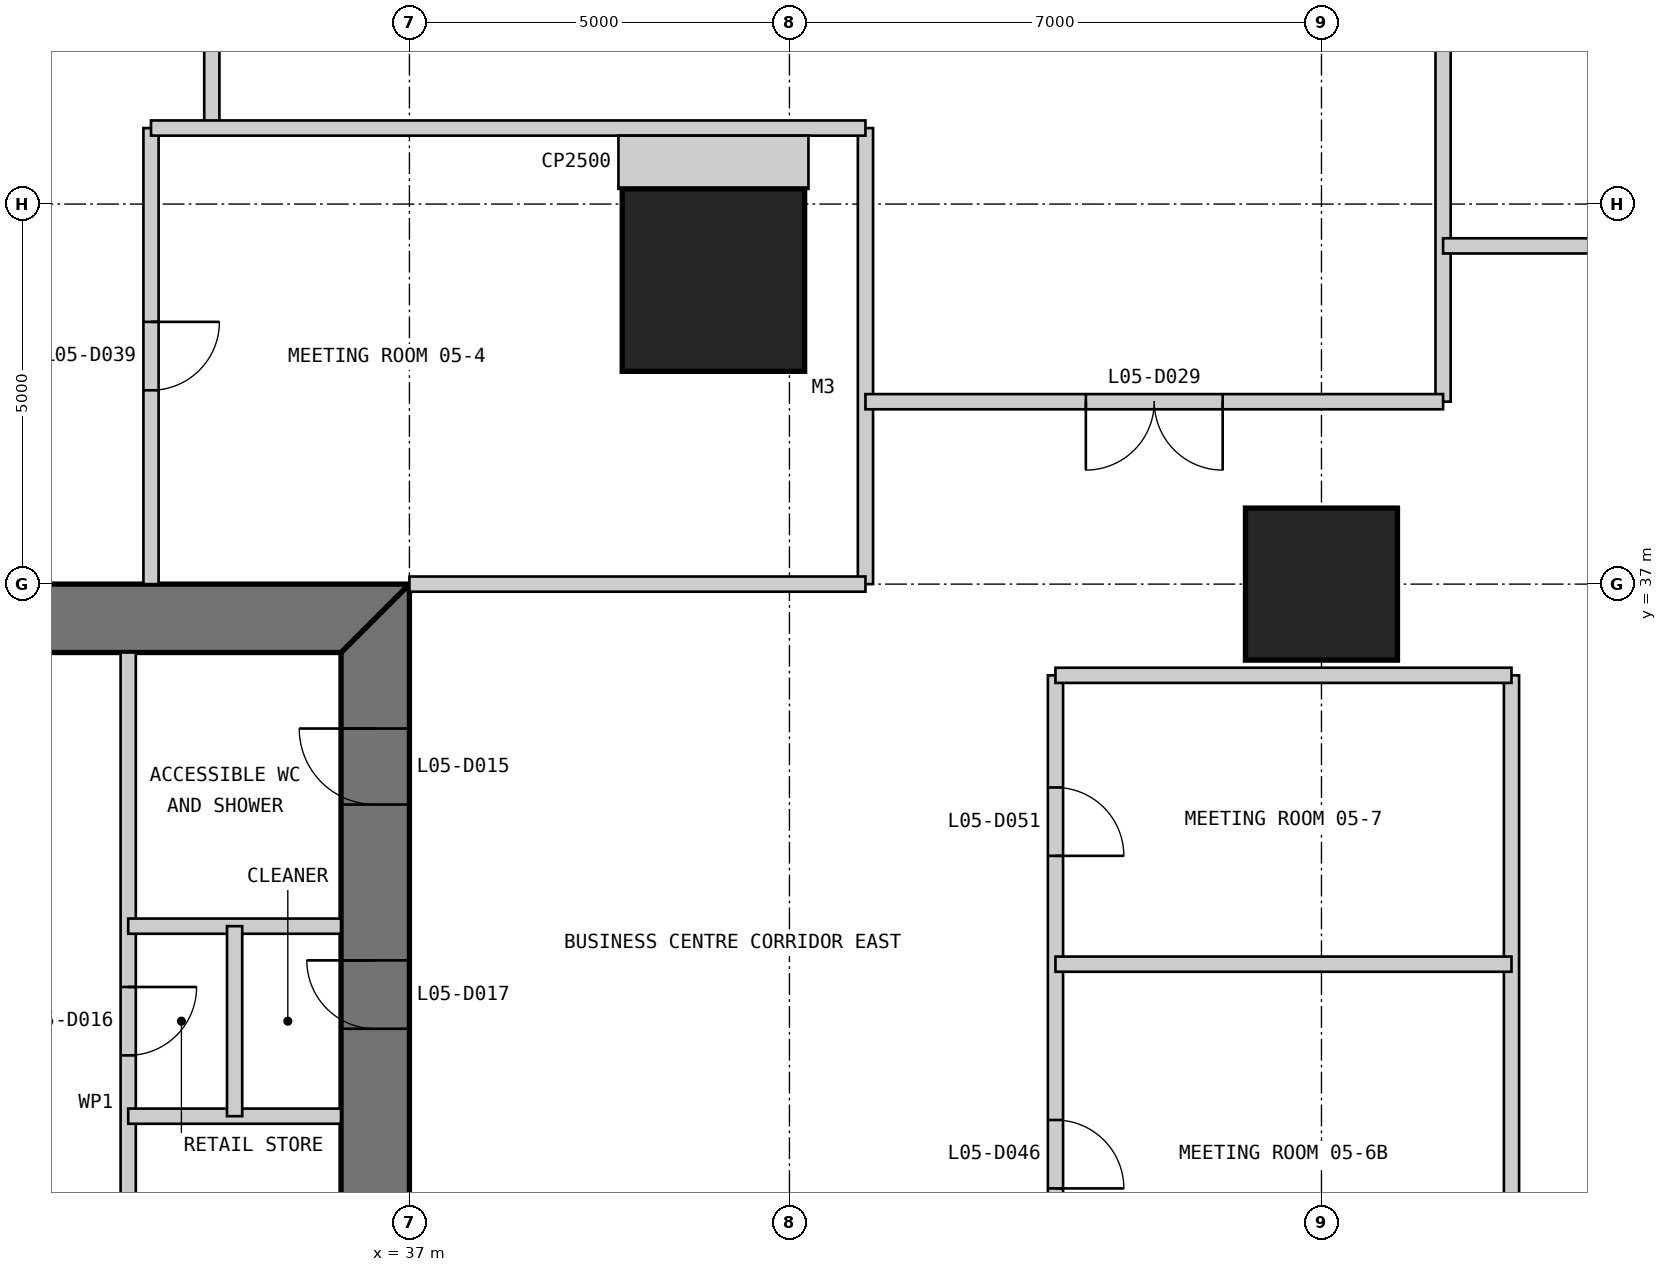
"""IFC4 building model, lengths in metres.
Left out: names, types, materials, properties, quantities, classifications, styles, units other than length and angle.
Written with IfcOpenShell. Run it as: python <this file> out.ifc"""

import sys

from ifc_helpers import new_model, si_unit, direction, frame, frame_2d, origin, origin_2d, place, context, subcontext, project, spatial, polyline, rectangle, outline, extrude, element, fill, save


model = new_model("IFC4")
c1 = context("Model", 3, precision=1e-05, world=origin(), true_north=direction((0.0, 1.0)))
c2 = subcontext(c1, "Body", "Model", "MODEL_VIEW")
j1 = project(units=[si_unit("LENGTHUNIT", "METRE"), si_unit("PLANEANGLEUNIT", "RADIAN")], contexts=[c1])
p1 = place(None, origin())
s1 = spatial("IfcSite", under=j1, at=p1, CompositionType="ELEMENT")
p2 = place(p1, origin())
s2 = spatial("IfcBuilding", under=s1, at=p2, CompositionType="ELEMENT")
p3 = place(p2, frame((0.0, 0.0, 26.2)))
s3 = spatial("IfcBuildingStorey", under=s2, at=p3, CompositionType="ELEMENT", Elevation=26.2)
p4 = place(p3, frame((41.0, 41.0, 0.0), z_axis=(0.0, 0.0, 1.0), x_axis=(1.0, 0.0, 0.0)))
e1 = element("IfcColumn", 1, at=p4, inside=s3, PredefinedType="COLUMN", context=c2, shape_type="SweptSolid", body=[
    extrude(rectangle(XDim=2.4, YDim=2.4, at=origin_2d()), origin(), (0.0, 0.0, 1.0), 4.8),
])
p5 = place(p3, frame((49.0, 37.0, 0.0), z_axis=(0.0, 0.0, 1.0), x_axis=(1.0, 0.0, 0.0)))
e2 = element("IfcColumn", 2, at=p5, inside=s3, PredefinedType="COLUMN", context=c2, shape_type="SweptSolid", body=[
    extrude(rectangle(XDim=2.0, YDim=2.0, at=origin_2d()), origin(), (0.0, 0.0, 1.0), 4.8),
])
p6 = place(p3, frame((36.55, 13.9, 0.0), z_axis=(0.0, 0.0, 1.0), x_axis=(0.0, 1.0, 0.0)))
e3 = element("IfcWall", 3, at=p6, inside=s3, PredefinedType="SHEAR", context=c2, shape_type="SweptSolid", body=[
    extrude(outline(polyline([(-0.9, -0.45), (23.1, -0.45), (22.2, 0.45), (0.0, 0.45), (-0.9, -0.45)])), origin(), (0.0, 0.0, 1.0), 4.8),
])
p7 = place(p6, frame((20.2, 0.0, 0.0)))
e4 = element("IfcOpeningElement", 4, at=p7, cuts=e3, PredefinedType="OPENING", context=c2, shape_type="SweptSolid", body=[
    extrude(rectangle(XDim=1.0, YDim=2.2, at=frame_2d((0.5, 1.1))), frame((0.0, 0.46, 0.0), z_axis=(0.0, -1.0, 0.0), x_axis=(1.0, 0.0, 0.0)), (0.0, 0.0, 1.0), 0.92),
])
p8 = place(p6, frame((17.25, 0.0, 0.0)))
e5 = element("IfcOpeningElement", 5, at=p8, cuts=e3, PredefinedType="OPENING", context=c2, shape_type="SweptSolid", body=[
    extrude(rectangle(XDim=0.9, YDim=2.2, at=frame_2d((0.45, 1.1))), frame((0.0, 0.46, 0.0), z_axis=(0.0, -1.0, 0.0), x_axis=(1.0, 0.0, 0.0)), (0.0, 0.0, 1.0), 0.92),
])
p9 = place(p3, frame((37.0, 36.55, 0.0), z_axis=(0.0, 0.0, 1.0), x_axis=(-1.0, 0.0, 0.0)))
e6 = element("IfcWall", 6, at=p9, inside=s3, PredefinedType="SHEAR", context=c2, shape_type="SweptSolid", body=[
    extrude(outline(polyline([(0.0, -0.45), (24.0, -0.45), (23.1, 0.45), (0.9, 0.45), (0.0, -0.45)])), origin(), (0.0, 0.0, 1.0), 4.8),
])
p10 = place(p9, frame((4.9, 0.0, 0.0)))
e7 = element("IfcOpeningElement", 7, at=p10, cuts=e6, PredefinedType="OPENING", context=c2, shape_type="SweptSolid", body=[
    extrude(rectangle(XDim=1.0, YDim=2.2, at=frame_2d((0.5, 1.1))), frame((0.0, 0.46, 0.0), z_axis=(0.0, -1.0, 0.0), x_axis=(1.0, 0.0, 0.0)), (0.0, 0.0, 1.0), 0.92),
])
p11 = place(p9, frame((8.9, 0.0, 0.0)))
e8 = element("IfcOpeningElement", 8, at=p11, cuts=e6, PredefinedType="OPENING", context=c2, shape_type="SweptSolid", body=[
    extrude(rectangle(XDim=1.1, YDim=2.2, at=frame_2d((0.55, 1.1))), frame((0.0, 0.46, 0.0), z_axis=(0.0, -1.0, 0.0), x_axis=(1.0, 0.0, 0.0)), (0.0, 0.0, 1.0), 0.92),
])
p12 = place(p9, frame((15.05, 0.0, 0.0)))
e9 = element("IfcOpeningElement", 9, at=p12, cuts=e6, PredefinedType="OPENING", context=c2, shape_type="SweptSolid", body=[
    extrude(rectangle(XDim=0.9, YDim=2.2, at=frame_2d((0.45, 1.1))), frame((0.0, 0.46, 0.0), z_axis=(0.0, -1.0, 0.0), x_axis=(1.0, 0.0, 0.0)), (0.0, 0.0, 1.0), 0.92),
])
p13 = place(p9, frame((17.9, 0.0, 0.0)))
e10 = element("IfcOpeningElement", 10, at=p13, cuts=e6, PredefinedType="OPENING", context=c2, shape_type="SweptSolid", body=[
    extrude(rectangle(XDim=1.0, YDim=2.2, at=frame_2d((0.5, 1.1))), frame((0.0, 0.46, 0.0), z_axis=(0.0, -1.0, 0.0), x_axis=(1.0, 0.0, 0.0)), (0.0, 0.0, 1.0), 0.92),
])
p14 = place(p9, frame((21.4, 0.0, 0.0)))
e11 = element("IfcOpeningElement", 11, at=p14, cuts=e6, PredefinedType="OPENING", context=c2, shape_type="SweptSolid", body=[
    extrude(rectangle(XDim=1.0, YDim=2.2, at=frame_2d((0.5, 1.1))), frame((0.0, 0.46, 0.0), z_axis=(0.0, -1.0, 0.0), x_axis=(1.0, 0.0, 0.0)), (0.0, 0.0, 1.0), 0.92),
])
p15 = place(p3, frame((33.3, 36.1, 0.0), z_axis=(0.0, 0.0, 1.0), x_axis=(0.0, -1.0, 0.0)))
e12 = element("IfcWall", 12, at=p15, inside=s3, PredefinedType="PARTITIONING", context=c2, shape_type="SweptSolid", body=[
    extrude(rectangle(XDim=16.1, YDim=0.2, at=frame_2d((8.05, 0.0))), origin(), (0.0, 0.0, 1.0), 4.6),
])
p16 = place(p15, frame((4.4, 0.0, 0.0)))
e13 = element("IfcOpeningElement", 13, at=p16, cuts=e12, PredefinedType="OPENING", context=c2, shape_type="SweptSolid", body=[
    extrude(rectangle(XDim=0.9, YDim=2.2, at=frame_2d((0.45, 1.1))), frame((0.0, 0.11, 0.0), z_axis=(0.0, -1.0, 0.0), x_axis=(1.0, 0.0, 0.0)), (0.0, 0.0, 1.0), 0.22),
])
for number, where, z_axis, x_axis in (
    (14, (36.1, 30.0, 0.0), (0.0, 0.0, 1.0), (-1.0, 0.0, 0.0)),
    (15, (36.1, 32.5, 0.0), (0.0, 0.0, 1.0), (-1.0, 0.0, 0.0)),
):
    element("IfcWall", number, at=place(p3, frame(where, z_axis=z_axis, x_axis=x_axis)), inside=s3, PredefinedType="PARTITIONING", context=c2, shape_type="SweptSolid", body=[
        extrude(rectangle(XDim=2.8, YDim=0.2, at=frame_2d((1.4, 0.0))), origin(), (0.0, 0.0, 1.0), 4.6),
    ])
p17 = place(p3, frame((34.7, 32.5, 0.0), z_axis=(0.0, 0.0, 1.0), x_axis=(0.0, -1.0, 0.0)))
e16 = element("IfcWall", 16, at=p17, inside=s3, PredefinedType="PARTITIONING", context=c2, shape_type="SweptSolid", body=[
    extrude(rectangle(XDim=2.5, YDim=0.2, at=frame_2d((1.25, 0.0))), origin(), (0.0, 0.0, 1.0), 4.6),
])
p18 = place(p3, frame((33.6, 37.0, 0.0), z_axis=(0.0, 0.0, 1.0), x_axis=(0.0, 1.0, 0.0)))
e17 = element("IfcWall", 17, at=p18, inside=s3, PredefinedType="PARTITIONING", context=c2, shape_type="SweptSolid", body=[
    extrude(rectangle(XDim=6.0, YDim=0.2, at=frame_2d((3.0, 0.0))), origin(), (0.0, 0.0, 1.0), 4.5),
])
p19 = place(p18, frame((2.55, 0.0, 0.0)))
e18 = element("IfcOpeningElement", 18, at=p19, cuts=e17, PredefinedType="OPENING", context=c2, shape_type="SweptSolid", body=[
    extrude(rectangle(XDim=0.9, YDim=2.2, at=frame_2d((0.45, 1.1))), frame((0.0, 0.11, 0.0), z_axis=(0.0, -1.0, 0.0), x_axis=(1.0, 0.0, 0.0)), (0.0, 0.0, 1.0), 0.22),
])
p20 = place(p3, frame((34.4, 43.0, 0.0), z_axis=(0.0, 0.0, 1.0), x_axis=(0.0, 1.0, 0.0)))
e19 = element("IfcWall", 19, at=p20, inside=s3, PredefinedType="PARTITIONING", context=c2, shape_type="SweptSolid", body=[
    extrude(rectangle(XDim=22.25, YDim=0.2, at=frame_2d((11.125, 0.0))), origin(), (0.0, 0.0, 1.0), 4.5),
])
p21 = place(p20, frame((17.5, 0.0, 0.0)))
e20 = element("IfcOpeningElement", 20, at=p21, cuts=e19, PredefinedType="OPENING", context=c2, shape_type="SweptSolid", body=[
    extrude(rectangle(XDim=1.8, YDim=2.4, at=frame_2d((0.9, 1.2))), frame((0.0, 0.11, 0.0), z_axis=(0.0, -1.0, 0.0), x_axis=(1.0, 0.0, 0.0)), (0.0, 0.0, 1.0), 0.22),
])
p22 = place(p3, frame((43.0, 37.0, 0.0), z_axis=(0.0, 0.0, 1.0), x_axis=(0.0, 1.0, 0.0)))
e21 = element("IfcWall", 21, at=p22, inside=s3, PredefinedType="PARTITIONING", context=c2, shape_type="SweptSolid", body=[
    extrude(rectangle(XDim=6.0, YDim=0.2, at=frame_2d((3.0, 0.0))), origin(), (0.0, 0.0, 1.0), 4.5),
])
p23 = place(p3, frame((45.5, 22.0, 0.0), z_axis=(0.0, 0.0, 1.0), x_axis=(0.0, 1.0, 0.0)))
e22 = element("IfcWall", 22, at=p23, inside=s3, PredefinedType="PARTITIONING", context=c2, shape_type="SweptSolid", body=[
    extrude(rectangle(XDim=13.8, YDim=0.2, at=frame_2d((6.9, 0.0))), origin(), (0.0, 0.0, 1.0), 4.5),
])
p24 = place(p23, frame((2.075, 0.0, 0.0)))
e23 = element("IfcOpeningElement", 23, at=p24, cuts=e22, PredefinedType="OPENING", context=c2, shape_type="SweptSolid", body=[
    extrude(rectangle(XDim=0.9, YDim=2.2, at=frame_2d((0.45, 1.1))), frame((0.0, 0.11, 0.0), z_axis=(0.0, -1.0, 0.0), x_axis=(1.0, 0.0, 0.0)), (0.0, 0.0, 1.0), 0.22),
])
p25 = place(p23, frame((7.05, 0.0, 0.0)))
e24 = element("IfcOpeningElement", 24, at=p25, cuts=e22, PredefinedType="OPENING", context=c2, shape_type="SweptSolid", body=[
    extrude(rectangle(XDim=0.9, YDim=2.2, at=frame_2d((0.45, 1.1))), frame((0.0, 0.11, 0.0), z_axis=(0.0, -1.0, 0.0), x_axis=(1.0, 0.0, 0.0)), (0.0, 0.0, 1.0), 0.22),
])
p26 = place(p23, frame((11.425, 0.0, 0.0)))
e25 = element("IfcOpeningElement", 25, at=p26, cuts=e22, PredefinedType="OPENING", context=c2, shape_type="SweptSolid", body=[
    extrude(rectangle(XDim=0.9, YDim=2.2, at=frame_2d((0.45, 1.1))), frame((0.0, 0.11, 0.0), z_axis=(0.0, -1.0, 0.0), x_axis=(1.0, 0.0, 0.0)), (0.0, 0.0, 1.0), 0.22),
])
p27 = place(p3, frame((50.6, 39.4, 0.0), z_axis=(0.0, 0.0, 1.0), x_axis=(0.0, 1.0, 0.0)))
e26 = element("IfcWall", 26, at=p27, inside=s3, PredefinedType="PARTITIONING", context=c2, shape_type="SweptSolid", body=[
    extrude(rectangle(XDim=25.85, YDim=0.2, at=frame_2d((12.925, 0.0))), origin(), (0.0, 0.0, 1.0), 4.5),
])
p28 = place(p3, frame((51.5, 22.0, 0.0), z_axis=(0.0, 0.0, 1.0), x_axis=(0.0, 1.0, 0.0)))
e27 = element("IfcWall", 27, at=p28, inside=s3, PredefinedType="PARTITIONING", context=c2, shape_type="SweptSolid", body=[
    extrude(rectangle(XDim=13.8, YDim=0.2, at=frame_2d((6.9, 0.0))), origin(), (0.0, 0.0, 1.0), 4.5),
])
for number, where, z_axis, x_axis in (
    (28, (45.5, 32.0, 0.0), (0.0, 0.0, 1.0), (1.0, 0.0, 0.0)),
    (29, (45.5, 35.8, 0.0), (0.0, 0.0, 1.0), (1.0, 0.0, 0.0)),
):
    element("IfcWall", number, at=place(p3, frame(where, z_axis=z_axis, x_axis=x_axis)), inside=s3, PredefinedType="PARTITIONING", context=c2, shape_type="SweptSolid", body=[
        extrude(rectangle(XDim=6.0, YDim=0.2, at=frame_2d((3.0, 0.0))), origin(), (0.0, 0.0, 1.0), 4.5),
    ])
p29 = place(p3, frame((37.0, 37.0, 0.0), z_axis=(0.0, 0.0, 1.0), x_axis=(1.0, 0.0, 0.0)))
e30 = element("IfcWall", 30, at=p29, inside=s3, PredefinedType="PARTITIONING", context=c2, shape_type="SweptSolid", body=[
    extrude(rectangle(XDim=6.0, YDim=0.2, at=frame_2d((3.0, 0.0))), origin(), (0.0, 0.0, 1.0), 3.703),
])
p30 = place(p3, frame((43.0, 39.4, 0.0), z_axis=(0.0, 0.0, 1.0), x_axis=(1.0, 0.0, 0.0)))
e31 = element("IfcWall", 31, at=p30, inside=s3, PredefinedType="PARTITIONING", context=c2, shape_type="SweptSolid", body=[
    extrude(rectangle(XDim=7.6, YDim=0.2, at=frame_2d((3.8, 0.0))), origin(), (0.0, 0.0, 1.0), 4.5),
])
p31 = place(p30, frame((2.9, 0.0, 0.0)))
e32 = element("IfcOpeningElement", 32, at=p31, cuts=e31, PredefinedType="OPENING", context=c2, shape_type="SweptSolid", body=[
    extrude(rectangle(XDim=1.8, YDim=2.4, at=frame_2d((0.9, 1.2))), frame((0.0, 0.11, 0.0), z_axis=(0.0, -1.0, 0.0), x_axis=(1.0, 0.0, 0.0)), (0.0, 0.0, 1.0), 0.22),
])
p32 = place(p3, frame((50.6, 41.45, 0.0), z_axis=(0.0, 0.0, 1.0), x_axis=(1.0, 0.0, 0.0)))
e33 = element("IfcWall", 33, at=p32, inside=s3, PredefinedType="PARTITIONING", context=c2, shape_type="SweptSolid", body=[
    extrude(rectangle(XDim=6.65, YDim=0.2, at=frame_2d((3.325, 0.0))), origin(), (0.0, 0.0, 1.0), 4.5),
])
p33 = place(p32, frame((2.425, 0.0, 0.0)))
e34 = element("IfcOpeningElement", 34, at=p33, cuts=e33, PredefinedType="OPENING", context=c2, shape_type="SweptSolid", body=[
    extrude(rectangle(XDim=1.8, YDim=2.4, at=frame_2d((0.9, 1.2))), frame((0.0, 0.11, 0.0), z_axis=(0.0, -1.0, 0.0), x_axis=(1.0, 0.0, 0.0)), (0.0, 0.0, 1.0), 0.22),
])
p34 = place(p3, frame((33.6, 43.0, 0.0), z_axis=(0.0, 0.0, 1.0), x_axis=(1.0, 0.0, 0.0)))
e35 = element("IfcWall", 35, at=p34, inside=s3, PredefinedType="PARTITIONING", context=c2, shape_type="SweptSolid", body=[
    extrude(rectangle(XDim=9.4, YDim=0.2, at=frame_2d((4.7, 0.0))), origin(), (0.0, 0.0, 1.0), 4.5),
])
p35 = place(p3, frame((41.0, 42.9, 0.0), z_axis=(0.0, 0.0, 1.0), x_axis=(0.0, -1.0, 0.0)))
e36 = element("IfcWall", 36, at=p35, inside=s3, PredefinedType="PARTITIONING", context=c2, shape_type="SweptSolid", body=[
    extrude(rectangle(XDim=0.7, YDim=2.5, at=frame_2d((0.35, 0.0))), origin(), (0.0, 0.0, 1.0), 4.5),
])
p36 = place(p7, origin())
e37 = element("IfcDoor", 37, at=p36, inside=s3, OperationType="SINGLE_SWING_RIGHT", PredefinedType="DOOR", context=c2, shape_type="SweptSolid", body=[
    extrude(rectangle(XDim=1.0, YDim=2.2, at=frame_2d((0.5, 1.1))), frame((0.0, 0.025, 0.0), z_axis=(0.0, -1.0, 0.0), x_axis=(1.0, 0.0, 0.0)), (0.0, 0.0, 1.0), 0.05),
    extrude(outline(polyline([(0.0, 0.0), (0.04, 0.0), (0.04, 2.16), (0.96, 2.16), (0.96, 0.0), (1.0, 0.0), (1.0, 2.2), (0.0, 2.2), (0.0, 0.0)])), frame((0.0, 0.3, 0.0), z_axis=(0.0, -1.0, 0.0), x_axis=(1.0, 0.0, 0.0)), (0.0, 0.0, 1.0), 0.6),
])
fill(e4, e37)
p37 = place(p16, origin())
e38 = element("IfcDoor", 38, at=p37, inside=s3, OperationType="SINGLE_SWING_LEFT", PredefinedType="DOOR", context=c2, shape_type="SweptSolid", body=[
    extrude(rectangle(XDim=0.9, YDim=2.2, at=frame_2d((0.45, 1.1))), frame((0.0, 0.025, 0.0), z_axis=(0.0, -1.0, 0.0), x_axis=(1.0, 0.0, 0.0)), (0.0, 0.0, 1.0), 0.05),
])
fill(e13, e38)
p38 = place(p8, origin())
e39 = element("IfcDoor", 39, at=p38, inside=s3, OperationType="SINGLE_SWING_RIGHT", PredefinedType="DOOR", context=c2, shape_type="SweptSolid", body=[
    extrude(rectangle(XDim=0.9, YDim=2.2, at=frame_2d((0.45, 1.1))), frame((0.0, 0.025, 0.0), z_axis=(0.0, -1.0, 0.0), x_axis=(1.0, 0.0, 0.0)), (0.0, 0.0, 1.0), 0.05),
    extrude(outline(polyline([(0.0, 0.0), (0.04, 0.0), (0.04, 2.16), (0.86, 2.16), (0.86, 0.0), (0.9, 0.0), (0.9, 2.2), (0.0, 2.2), (0.0, 0.0)])), frame((0.0, 0.3, 0.0), z_axis=(0.0, -1.0, 0.0), x_axis=(1.0, 0.0, 0.0)), (0.0, 0.0, 1.0), 0.6),
])
fill(e5, e39)
p39 = place(p31, frame((1.8, 0.0, 0.0), z_axis=(0.0, 0.0, 1.0), x_axis=(-1.0, 0.0, 0.0)))
e40 = element("IfcDoor", 40, at=p39, inside=s3, OperationType="DOUBLE_DOOR_SINGLE_SWING", PredefinedType="DOOR", context=c2, shape_type="SweptSolid", body=[
    extrude(rectangle(XDim=1.8, YDim=2.4, at=frame_2d((0.9, 1.2))), frame((0.0, 0.025, 0.0), z_axis=(0.0, -1.0, 0.0), x_axis=(1.0, 0.0, 0.0)), (0.0, 0.0, 1.0), 0.05),
])
fill(e32, e40)
p40 = place(p19, frame((0.9, 0.0, 0.0), z_axis=(0.0, 0.0, 1.0), x_axis=(-1.0, 0.0, 0.0)))
e41 = element("IfcDoor", 41, at=p40, inside=s3, OperationType="SINGLE_SWING_LEFT", PredefinedType="DOOR", context=c2, shape_type="SweptSolid", body=[
    extrude(rectangle(XDim=0.9, YDim=2.2, at=frame_2d((0.45, 1.1))), frame((0.0, 0.025, 0.0), z_axis=(0.0, -1.0, 0.0), x_axis=(1.0, 0.0, 0.0)), (0.0, 0.0, 1.0), 0.05),
])
fill(e18, e41)
p41 = place(p25, frame((0.9, 0.0, 0.0), z_axis=(0.0, 0.0, 1.0), x_axis=(-1.0, 0.0, 0.0)))
e42 = element("IfcDoor", 42, at=p41, inside=s3, OperationType="SINGLE_SWING_RIGHT", PredefinedType="DOOR", context=c2, shape_type="SweptSolid", body=[
    extrude(rectangle(XDim=0.9, YDim=2.2, at=frame_2d((0.45, 1.1))), frame((0.0, 0.025, 0.0), z_axis=(0.0, -1.0, 0.0), x_axis=(1.0, 0.0, 0.0)), (0.0, 0.0, 1.0), 0.05),
])
fill(e24, e42)
p42 = place(p26, frame((0.9, 0.0, 0.0), z_axis=(0.0, 0.0, 1.0), x_axis=(-1.0, 0.0, 0.0)))
e43 = element("IfcDoor", 43, at=p42, inside=s3, OperationType="SINGLE_SWING_RIGHT", PredefinedType="DOOR", context=c2, shape_type="SweptSolid", body=[
    extrude(rectangle(XDim=0.9, YDim=2.2, at=frame_2d((0.45, 1.1))), frame((0.0, 0.025, 0.0), z_axis=(0.0, -1.0, 0.0), x_axis=(1.0, 0.0, 0.0)), (0.0, 0.0, 1.0), 0.05),
])
fill(e25, e43)
save(model, sys.argv[1])
